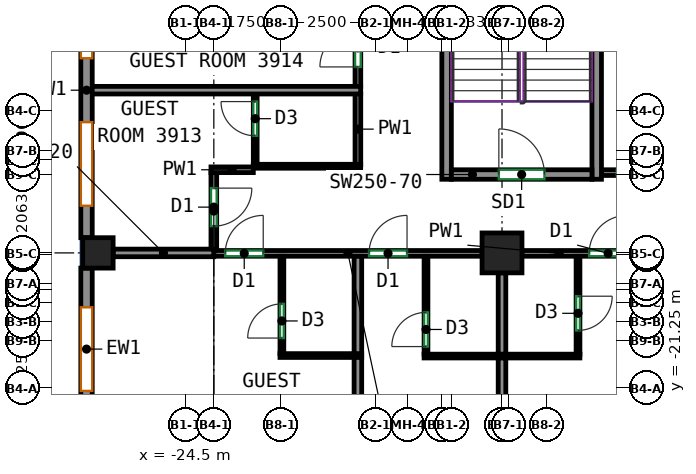
"""IFC4 building model, lengths in metres.
Left out: names, types, materials, properties, quantities, classifications, styles, units other than length and angle.
Written with IfcOpenShell. Run it as: python <this file> out.ifc"""

import sys

from ifc_helpers import new_model, si_unit, direction, frame, frame_2d, origin, origin_2d, place, context, subcontext, project, spatial, rectangle, extrude, source, transform, mapped, element, fill, save


model = new_model("IFC4")
c1 = context("Model", 3, precision=1e-05, world=origin(), true_north=direction((0.0, 1.0)))
c2 = subcontext(c1, "Body", "Model", "MODEL_VIEW")
j1 = project(units=[si_unit("LENGTHUNIT", "METRE"), si_unit("PLANEANGLEUNIT", "RADIAN")], contexts=[c1])
p1 = place(None, origin())
s1 = spatial("IfcSite", under=j1, at=p1, CompositionType="ELEMENT")
p2 = place(p1, origin())
s2 = spatial("IfcBuilding", under=s1, at=p2, CompositionType="ELEMENT")
p3 = place(p2, frame((0.0, 0.0, 168.5)))
s3 = spatial("IfcBuildingStorey", under=s2, at=p3, CompositionType="ELEMENT", Elevation=168.5)
m1 = source(origin(), c2, "Body", "SweptSolid", [
    extrude(rectangle(XDim=0.8, YDim=0.8, at=origin_2d()), origin(), (0.0, 0.0, 1.0), 3.12),
])
p4 = place(p3, frame((-26.8, -17.688, 0.0), z_axis=(0.0, 0.0, 1.0), x_axis=(1.0, 0.0, 0.0)))
e1 = element("IfcColumn", 1, at=p4, inside=s3, PredefinedType="COLUMN", context=c2, shape_type="MappedRepresentation", body=[
    mapped(m1, transform((0.0, 0.0, 0.0))),
])
m2 = source(origin(), c2, "Body", "SweptSolid", [
    extrude(rectangle(XDim=1.05, YDim=1.05, at=origin_2d()), origin(), (0.0, 0.0, 1.0), 3.12),
])
p5 = place(p3, frame((-16.167, -17.688, 0.0), z_axis=(0.0, 0.0, 1.0), x_axis=(1.0, 0.0, 0.0)))
e2 = element("IfcColumn", 2, at=p5, inside=s3, PredefinedType="COLUMN", context=c2, shape_type="MappedRepresentation", body=[
    mapped(m2, transform((0.0, 0.0, 0.0))),
])
m3 = source(origin(), c2, "Body", "SweptSolid", [
    extrude(rectangle(XDim=8.0, YDim=0.25, at=frame_2d((4.0, 0.0))), origin(), (0.0, 0.0, 1.0), 3.12),
])
for number, where, z_axis, x_axis in (
    (3, (-17.625, -15.75, 0.0), (0.0, 0.0, 1.0), (0.0, 1.0, 0.0)),
    (4, (-13.675, -15.75, 0.0), (0.0, 0.0, 1.0), (0.0, 1.0, 0.0)),
):
    element("IfcWall", number, at=place(p3, frame(where, z_axis=z_axis, x_axis=x_axis)), inside=s3, PredefinedType="SHEAR", context=c2, shape_type="MappedRepresentation", body=[
        mapped(m3, transform((0.0, 0.0, 0.0))),
    ])
m4 = source(origin(), c2, "Body", "SweptSolid", [
    extrude(rectangle(XDim=3.7, YDim=0.25, at=frame_2d((1.85, 0.0))), origin(), (0.0, 0.0, 1.0), 3.12),
])
p6 = place(p3, frame((-17.5, -15.625, 0.0), z_axis=(0.0, 0.0, 1.0), x_axis=(1.0, 0.0, 0.0)))
e5 = element("IfcWall", 5, at=p6, inside=s3, PredefinedType="SHEAR", context=c2, shape_type="MappedRepresentation", body=[
    mapped(m4, transform((0.0, 0.0, 0.0))),
])
p7 = place(p6, frame((1.25, 0.0, 0.0)))
e6 = element("IfcOpeningElement", 6, at=p7, cuts=e5, PredefinedType="OPENING", context=c2, shape_type="SweptSolid", body=[
    extrude(rectangle(XDim=1.2, YDim=2.1, at=frame_2d((0.6, 1.05))), frame((0.0, 0.135, 0.0), z_axis=(0.0, -1.0, 0.0), x_axis=(1.0, 0.0, 0.0)), (0.0, 0.0, 1.0), 0.27),
])
m5 = source(origin(), c2, "Body", "SweptSolid", [
    extrude(rectangle(XDim=7.763, YDim=0.3, at=frame_2d((3.881, 0.0))), origin(), (0.0, 0.0, 1.0), 3.12),
])
p8 = place(p3, frame((-27.1, -9.525, 0.0), z_axis=(0.0, 0.0, 1.0), x_axis=(0.0, -1.0, 0.0)))
e7 = element("IfcWall", 7, at=p8, inside=s3, PredefinedType="SOLIDWALL", context=c2, shape_type="MappedRepresentation", body=[
    mapped(m5, transform((0.0, 0.0, 0.0))),
])
p9 = place(p8, frame((0.841, 0.0, 0.85)))
e8 = element("IfcOpeningElement", 8, at=p9, cuts=e7, PredefinedType="OPENING", context=c2, shape_type="SweptSolid", body=[
    extrude(rectangle(XDim=2.2, YDim=1.95, at=frame_2d((1.1, 0.975))), frame((0.0, 0.16, 0.0), z_axis=(0.0, -1.0, 0.0), x_axis=(1.0, 0.0, 0.0)), (0.0, 0.0, 1.0), 0.32),
])
p10 = place(p8, frame((4.722, 0.0, 0.85)))
e9 = element("IfcOpeningElement", 9, at=p10, cuts=e7, PredefinedType="OPENING", context=c2, shape_type="SweptSolid", body=[
    extrude(rectangle(XDim=2.2, YDim=1.95, at=frame_2d((1.1, 0.975))), frame((0.0, 0.16, 0.0), z_axis=(0.0, -1.0, 0.0), x_axis=(1.0, 0.0, 0.0)), (0.0, 0.0, 1.0), 0.32),
])
m6 = source(origin(), c2, "Body", "SweptSolid", [
    extrude(rectangle(XDim=4.263, YDim=0.3, at=frame_2d((2.131, 0.0))), origin(), (0.0, 0.0, 1.0), 3.12),
])
p11 = place(p3, frame((-27.1, -18.087, 0.0), z_axis=(0.0, 0.0, 1.0), x_axis=(0.0, -1.0, 0.0)))
e10 = element("IfcWall", 10, at=p11, inside=s3, PredefinedType="SOLIDWALL", context=c2, shape_type="MappedRepresentation", body=[
    mapped(m6, transform((0.0, 0.0, 0.0))),
])
p12 = place(p11, frame((1.031, 0.0, 0.85)))
e11 = element("IfcOpeningElement", 11, at=p12, cuts=e10, PredefinedType="OPENING", context=c2, shape_type="SweptSolid", body=[
    extrude(rectangle(XDim=2.2, YDim=1.95, at=frame_2d((1.1, 0.975))), frame((0.0, 0.16, 0.0), z_axis=(0.0, -1.0, 0.0), x_axis=(1.0, 0.0, 0.0)), (0.0, 0.0, 1.0), 0.32),
])
p13 = place(p3, frame((-23.75, -17.7, 0.0), z_axis=(0.0, 0.0, 1.0), x_axis=(1.0, 0.0, 0.0)))
e12 = element("IfcWall", 12, at=p13, inside=s3, PredefinedType="PARTITIONING", context=c2, shape_type="SweptSolid", body=[
    extrude(rectangle(XDim=7.058, YDim=0.15, at=frame_2d((3.529, 0.0))), origin(), (0.0, 0.0, 1.0), 2.52),
])
p14 = place(p13, frame((0.3, 0.0, 0.0)))
e13 = element("IfcOpeningElement", 13, at=p14, cuts=e12, PredefinedType="OPENING", context=c2, shape_type="SweptSolid", body=[
    extrude(rectangle(XDim=1.0, YDim=2.1, at=frame_2d((0.5, 1.05))), frame((0.0, 0.085, 0.0), z_axis=(0.0, -1.0, 0.0), x_axis=(1.0, 0.0, 0.0)), (0.0, 0.0, 1.0), 0.17),
])
p15 = place(p13, frame((4.084, 0.0, 0.0)))
e14 = element("IfcOpeningElement", 14, at=p15, cuts=e12, PredefinedType="OPENING", context=c2, shape_type="SweptSolid", body=[
    extrude(rectangle(XDim=1.0, YDim=2.1, at=frame_2d((0.5, 1.05))), frame((0.0, 0.085, 0.0), z_axis=(0.0, -1.0, 0.0), x_axis=(1.0, 0.0, 0.0)), (0.0, 0.0, 1.0), 0.17),
])
p16 = place(p3, frame((-15.642, -17.7, 0.0), z_axis=(0.0, 0.0, 1.0), x_axis=(1.0, 0.0, 0.0)))
e15 = element("IfcWall", 15, at=p16, inside=s3, PredefinedType="PARTITIONING", context=c2, shape_type="SweptSolid", body=[
    extrude(rectangle(XDim=6.534, YDim=0.15, at=frame_2d((3.267, 0.0))), origin(), (0.0, 0.0, 1.0), 3.12),
])
p17 = place(p16, frame((1.768, 0.0, 0.0)))
e16 = element("IfcOpeningElement", 16, at=p17, cuts=e15, PredefinedType="OPENING", context=c2, shape_type="SweptSolid", body=[
    extrude(rectangle(XDim=1.0, YDim=2.1, at=frame_2d((0.5, 1.05))), frame((0.0, 0.085, 0.0), z_axis=(0.0, -1.0, 0.0), x_axis=(1.0, 0.0, 0.0)), (0.0, 0.0, 1.0), 0.17),
])
p18 = place(p16, frame((3.56, 0.0, 0.0)))
e17 = element("IfcOpeningElement", 17, at=p18, cuts=e15, PredefinedType="OPENING", context=c2, shape_type="SweptSolid", body=[
    extrude(rectangle(XDim=1.0, YDim=2.1, at=frame_2d((0.5, 1.05))), frame((0.0, 0.085, 0.0), z_axis=(0.0, -1.0, 0.0), x_axis=(1.0, 0.0, 0.0)), (0.0, 0.0, 1.0), 0.17),
])
p19 = place(p3, frame((-23.75, -15.575, 0.0), z_axis=(0.0, 0.0, 1.0), x_axis=(0.0, -1.0, 0.0)))
e18 = element("IfcWall", 18, at=p19, inside=s3, PredefinedType="PARTITIONING", context=c2, shape_type="SweptSolid", body=[
    extrude(rectangle(XDim=2.023, YDim=0.15, at=frame_2d((1.011, 0.0))), origin(), (0.0, 0.0, 1.0), 2.52),
])
p20 = place(p19, frame((0.408, 0.0, 0.0)))
e19 = element("IfcOpeningElement", 19, at=p20, cuts=e18, PredefinedType="OPENING", context=c2, shape_type="SweptSolid", body=[
    extrude(rectangle(XDim=1.0, YDim=2.1, at=frame_2d((0.5, 1.05))), frame((0.0, 0.085, 0.0), z_axis=(0.0, -1.0, 0.0), x_axis=(1.0, 0.0, 0.0)), (0.0, 0.0, 1.0), 0.17),
])
p21 = place(p3, frame((-23.825, -15.5, 0.0), z_axis=(0.0, 0.0, 1.0), x_axis=(1.0, 0.0, 0.0)))
e20 = element("IfcWall", 20, at=p21, inside=s3, PredefinedType="PARTITIONING", context=c2, shape_type="SweptSolid", body=[
    extrude(rectangle(XDim=1.114, YDim=0.15, at=frame_2d((0.557, 0.0))), origin(), (0.0, 0.0, 1.0), 3.12),
])
p22 = place(p3, frame((-19.959, -15.366, 0.0), z_axis=(0.0, 0.0, 1.0), x_axis=(0.0, 1.0, 0.0)))
e21 = element("IfcWall", 21, at=p22, inside=s3, PredefinedType="PARTITIONING", context=c2, shape_type="SweptSolid", body=[
    extrude(rectangle(XDim=1.87, YDim=0.15, at=frame_2d((0.935, 0.0))), origin(), (0.0, 0.0, 1.0), 3.12),
])
p23 = place(p3, frame((-19.959, -13.316, 0.0), z_axis=(0.0, 0.0, 1.0), x_axis=(0.0, 1.0, 0.0)))
e22 = element("IfcWall", 22, at=p23, inside=s3, PredefinedType="PARTITIONING", context=c2, shape_type="SweptSolid", body=[
    extrude(rectangle(XDim=2.151, YDim=0.15, at=frame_2d((1.075, 0.0))), origin(), (0.0, 0.0, 1.0), 3.12),
])
p24 = place(p23, frame((0.522, 0.0, 0.0)))
e23 = element("IfcOpeningElement", 23, at=p24, cuts=e22, PredefinedType="OPENING", context=c2, shape_type="SweptSolid", body=[
    extrude(rectangle(XDim=1.0, YDim=2.1, at=frame_2d((0.5, 1.05))), frame((0.0, 0.085, 0.0), z_axis=(0.0, -1.0, 0.0), x_axis=(1.0, 0.0, 0.0)), (0.0, 0.0, 1.0), 0.17),
])
p25 = place(p3, frame((-8.573, -15.575, 0.0), z_axis=(0.0, 0.0, 1.0), x_axis=(-1.0, 0.0, 0.0)))
e24 = element("IfcWall", 24, at=p25, inside=s3, PredefinedType="PARTITIONING", context=c2, shape_type="SweptSolid", body=[
    extrude(rectangle(XDim=4.977, YDim=0.15, at=frame_2d((2.489, 0.0))), origin(), (0.0, 0.0, 1.0), 3.12),
])
p26 = place(p25, frame((3.673, 0.0, 0.0)))
e25 = element("IfcOpeningElement", 25, at=p26, cuts=e24, PredefinedType="OPENING", context=c2, shape_type="SweptSolid", body=[
    extrude(rectangle(XDim=0.9, YDim=2.1, at=frame_2d((0.45, 1.05))), frame((0.0, 0.085, 0.0), z_axis=(0.0, -1.0, 0.0), x_axis=(1.0, 0.0, 0.0)), (0.0, 0.0, 1.0), 0.17),
])
p27 = place(p3, frame((-21.959, -20.338, 0.0), z_axis=(0.0, 0.0, 1.0), x_axis=(0.0, 1.0, 0.0)))
e26 = element("IfcWall", 26, at=p27, inside=s3, PredefinedType="PARTITIONING", context=c2, shape_type="SweptSolid", body=[
    extrude(rectangle(XDim=2.561, YDim=0.1, at=frame_2d((1.28, 0.0))), origin(), (0.0, 0.0, 1.0), 3.12),
])
p28 = place(p27, frame((0.41, 0.0, 0.0)))
e27 = element("IfcOpeningElement", 27, at=p28, cuts=e26, PredefinedType="OPENING", context=c2, shape_type="SweptSolid", body=[
    extrude(rectangle(XDim=0.9, YDim=2.1, at=frame_2d((0.45, 1.05))), frame((0.0, 0.06, 0.0), z_axis=(0.0, -1.0, 0.0), x_axis=(1.0, 0.0, 0.0)), (0.0, 0.0, 1.0), 0.12),
])
p29 = place(p3, frame((-22.009, -20.388, 0.0), z_axis=(0.0, 0.0, 1.0), x_axis=(1.0, 0.0, 0.0)))
e28 = element("IfcWall", 28, at=p29, inside=s3, PredefinedType="PARTITIONING", context=c2, shape_type="SweptSolid", body=[
    extrude(rectangle(XDim=2.15, YDim=0.1, at=frame_2d((1.075, 0.0))), origin(), (0.0, 0.0, 1.0), 3.12),
])
p30 = place(p3, frame((-19.959, -26.0, 0.0), z_axis=(0.0, 0.0, 1.0), x_axis=(0.0, 1.0, 0.0)))
e29 = element("IfcWall", 29, at=p30, inside=s3, PredefinedType="PARTITIONING", context=c2, shape_type="SweptSolid", body=[
    extrude(rectangle(XDim=5.562, YDim=0.2, at=frame_2d((2.781, 0.0))), origin(), (0.0, 0.0, 1.0), 3.12),
])
p31 = place(p3, frame((-26.4, -17.688, 0.0), z_axis=(0.0, 0.0, 1.0), x_axis=(1.0, 0.0, 0.0)))
e30 = element("IfcWall", 30, at=p31, inside=s3, PredefinedType="PARTITIONING", context=c2, shape_type="SweptSolid", body=[
    extrude(rectangle(XDim=2.648, YDim=0.2, at=frame_2d((1.324, 0.0))), origin(), (0.0, 0.0, 1.0), 2.52),
])
p32 = place(p3, frame((-19.959, -20.338, 0.0), z_axis=(0.0, 0.0, 1.0), x_axis=(0.0, 1.0, 0.0)))
e31 = element("IfcWall", 31, at=p32, inside=s3, PredefinedType="PARTITIONING", context=c2, shape_type="SweptSolid", body=[
    extrude(rectangle(XDim=2.561, YDim=0.2, at=frame_2d((1.28, 0.0))), origin(), (0.0, 0.0, 1.0), 3.12),
])
p33 = place(p3, frame((-18.167, -20.352, 0.0), z_axis=(0.0, 0.0, 1.0), x_axis=(0.0, 1.0, 0.0)))
e32 = element("IfcWall", 32, at=p33, inside=s3, PredefinedType="PARTITIONING", context=c2, shape_type="SweptSolid", body=[
    extrude(rectangle(XDim=2.575, YDim=0.1, at=frame_2d((1.288, 0.0))), origin(), (0.0, 0.0, 1.0), 3.12),
])
p34 = place(p33, frame((0.2, 0.0, 0.0)))
e33 = element("IfcOpeningElement", 33, at=p34, cuts=e32, PredefinedType="OPENING", context=c2, shape_type="SweptSolid", body=[
    extrude(rectangle(XDim=0.9, YDim=2.1, at=frame_2d((0.45, 1.05))), frame((0.0, 0.06, 0.0), z_axis=(0.0, -1.0, 0.0), x_axis=(1.0, 0.0, 0.0)), (0.0, 0.0, 1.0), 0.12),
])
p35 = place(p3, frame((-18.217, -20.402, 0.0), z_axis=(0.0, 0.0, 1.0), x_axis=(1.0, 0.0, 0.0)))
e34 = element("IfcWall", 34, at=p35, inside=s3, PredefinedType="PARTITIONING", context=c2, shape_type="SweptSolid", body=[
    extrude(rectangle(XDim=4.1, YDim=0.1, at=frame_2d((2.05, 0.0))), origin(), (0.0, 0.0, 1.0), 3.12),
])
p36 = place(p3, frame((-16.167, -25.4, 0.0), z_axis=(0.0, 0.0, 1.0), x_axis=(0.0, 1.0, 0.0)))
e35 = element("IfcWall", 35, at=p36, inside=s3, PredefinedType="PARTITIONING", context=c2, shape_type="SweptSolid", body=[
    extrude(rectangle(XDim=4.948, YDim=0.2, at=frame_2d((2.474, 0.0))), origin(), (0.0, 0.0, 1.0), 3.12),
])
p37 = place(p3, frame((-16.167, -20.352, 0.0), z_axis=(0.0, 0.0, 1.0), x_axis=(0.0, 1.0, 0.0)))
e36 = element("IfcWall", 36, at=p37, inside=s3, PredefinedType="PARTITIONING", context=c2, shape_type="SweptSolid", body=[
    extrude(rectangle(XDim=2.14, YDim=0.2, at=frame_2d((1.07, 0.0))), origin(), (0.0, 0.0, 1.0), 3.12),
])
p38 = place(p3, frame((-14.167, -17.777, 0.0), z_axis=(0.0, 0.0, 1.0), x_axis=(0.0, -1.0, 0.0)))
e37 = element("IfcWall", 37, at=p38, inside=s3, PredefinedType="PARTITIONING", context=c2, shape_type="SweptSolid", body=[
    extrude(rectangle(XDim=2.575, YDim=0.1, at=frame_2d((1.288, 0.0))), origin(), (0.0, 0.0, 1.0), 3.12),
])
p39 = place(p38, frame((1.05, 0.0, 0.0)))
e38 = element("IfcOpeningElement", 38, at=p39, cuts=e37, PredefinedType="OPENING", context=c2, shape_type="SweptSolid", body=[
    extrude(rectangle(XDim=0.9, YDim=2.1, at=frame_2d((0.45, 1.05))), frame((0.0, 0.06, 0.0), z_axis=(0.0, -1.0, 0.0), x_axis=(1.0, 0.0, 0.0)), (0.0, 0.0, 1.0), 0.12),
])
p40 = place(p3, frame((-19.886, -15.406, 0.0), z_axis=(0.0, 0.0, 1.0), x_axis=(-1.0, 0.0, 0.0)))
e39 = element("IfcWall", 39, at=p40, inside=s3, PredefinedType="PARTITIONING", context=c2, shape_type="SweptSolid", body=[
    extrude(rectangle(XDim=2.825, YDim=0.1, at=frame_2d((1.413, 0.0))), origin(), (0.0, 0.0, 1.0), 3.12),
])
p41 = place(p3, frame((-22.661, -15.356, 0.0), z_axis=(0.0, 0.0, 1.0), x_axis=(0.0, 1.0, 0.0)))
e40 = element("IfcWall", 40, at=p41, inside=s3, PredefinedType="PARTITIONING", context=c2, shape_type="SweptSolid", body=[
    extrude(rectangle(XDim=1.85, YDim=0.1, at=frame_2d((0.925, 0.0))), origin(), (0.0, 0.0, 1.0), 3.12),
])
p42 = place(p41, frame((0.75, 0.0, 0.0)))
e41 = element("IfcOpeningElement", 41, at=p42, cuts=e40, PredefinedType="OPENING", context=c2, shape_type="SweptSolid", body=[
    extrude(rectangle(XDim=0.9, YDim=2.1, at=frame_2d((0.45, 1.05))), frame((0.0, 0.06, 0.0), z_axis=(0.0, -1.0, 0.0), x_axis=(1.0, 0.0, 0.0)), (0.0, 0.0, 1.0), 0.12),
])
p43 = place(p3, frame((-27.0, -13.406, 0.0), z_axis=(0.0, 0.0, 1.0), x_axis=(1.0, 0.0, 0.0)))
e42 = element("IfcWall", 42, at=p43, inside=s3, PredefinedType="PARTITIONING", context=c2, shape_type="SweptSolid", body=[
    extrude(rectangle(XDim=7.114, YDim=0.2, at=frame_2d((3.557, 0.0))), origin(), (0.0, 0.0, 1.0), 3.12),
])
p44 = place(p9, origin())
e43 = element("IfcWindow", 43, at=p44, inside=s3, PartitioningType="SINGLE_PANEL", PredefinedType="WINDOW", context=c2, shape_type="SweptSolid", body=[
    extrude(rectangle(XDim=2.2, YDim=1.95, at=frame_2d((1.1, 0.975))), frame((0.0, 0.03, 0.0), z_axis=(0.0, -1.0, 0.0), x_axis=(1.0, 0.0, 0.0)), (0.0, 0.0, 1.0), 0.06),
])
fill(e8, e43)
p45 = place(p10, origin())
e44 = element("IfcWindow", 44, at=p45, inside=s3, PartitioningType="SINGLE_PANEL", PredefinedType="WINDOW", context=c2, shape_type="SweptSolid", body=[
    extrude(rectangle(XDim=2.2, YDim=1.95, at=frame_2d((1.1, 0.975))), frame((0.0, 0.03, 0.0), z_axis=(0.0, -1.0, 0.0), x_axis=(1.0, 0.0, 0.0)), (0.0, 0.0, 1.0), 0.06),
])
fill(e9, e44)
p46 = place(p12, origin())
e45 = element("IfcWindow", 45, at=p46, inside=s3, PartitioningType="SINGLE_PANEL", PredefinedType="WINDOW", context=c2, shape_type="SweptSolid", body=[
    extrude(rectangle(XDim=2.2, YDim=1.95, at=frame_2d((1.1, 0.975))), frame((0.0, 0.03, 0.0), z_axis=(0.0, -1.0, 0.0), x_axis=(1.0, 0.0, 0.0)), (0.0, 0.0, 1.0), 0.06),
])
fill(e11, e45)
p47 = place(p7, origin())
e46 = element("IfcDoor", 46, at=p47, inside=s3, OperationType="DOUBLE_DOOR_SINGLE_SWING", PredefinedType="DOOR", context=c2, shape_type="SweptSolid", body=[
    extrude(rectangle(XDim=1.2, YDim=2.1, at=frame_2d((0.6, 1.05))), frame((0.0, 0.025, 0.0), z_axis=(0.0, -1.0, 0.0), x_axis=(1.0, 0.0, 0.0)), (0.0, 0.0, 1.0), 0.05),
])
fill(e6, e46)
p48 = place(p34, origin())
e47 = element("IfcDoor", 47, at=p48, inside=s3, OperationType="SINGLE_SWING_LEFT", PredefinedType="DOOR", context=c2, shape_type="SweptSolid", body=[
    extrude(rectangle(XDim=0.9, YDim=2.1, at=frame_2d((0.45, 1.05))), frame((0.0, 0.025, 0.0), z_axis=(0.0, -1.0, 0.0), x_axis=(1.0, 0.0, 0.0)), (0.0, 0.0, 1.0), 0.05),
])
fill(e33, e47)
p49 = place(p28, origin())
e48 = element("IfcDoor", 48, at=p49, inside=s3, OperationType="SINGLE_SWING_LEFT", PredefinedType="DOOR", context=c2, shape_type="SweptSolid", body=[
    extrude(rectangle(XDim=0.9, YDim=2.1, at=frame_2d((0.45, 1.05))), frame((0.0, 0.025, 0.0), z_axis=(0.0, -1.0, 0.0), x_axis=(1.0, 0.0, 0.0)), (0.0, 0.0, 1.0), 0.05),
])
fill(e27, e48)
p50 = place(p39, origin())
e49 = element("IfcDoor", 49, at=p50, inside=s3, OperationType="SINGLE_SWING_LEFT", PredefinedType="DOOR", context=c2, shape_type="SweptSolid", body=[
    extrude(rectangle(XDim=0.9, YDim=2.1, at=frame_2d((0.45, 1.05))), frame((0.0, 0.025, 0.0), z_axis=(0.0, -1.0, 0.0), x_axis=(1.0, 0.0, 0.0)), (0.0, 0.0, 1.0), 0.05),
])
fill(e38, e49)
p51 = place(p14, origin())
e50 = element("IfcDoor", 50, at=p51, inside=s3, OperationType="SINGLE_SWING_RIGHT", PredefinedType="DOOR", context=c2, shape_type="SweptSolid", body=[
    extrude(rectangle(XDim=1.0, YDim=2.1, at=frame_2d((0.5, 1.05))), frame((0.0, 0.025, 0.0), z_axis=(0.0, -1.0, 0.0), x_axis=(1.0, 0.0, 0.0)), (0.0, 0.0, 1.0), 0.05),
])
fill(e13, e50)
p52 = place(p15, origin())
e51 = element("IfcDoor", 51, at=p52, inside=s3, OperationType="SINGLE_SWING_RIGHT", PredefinedType="DOOR", context=c2, shape_type="SweptSolid", body=[
    extrude(rectangle(XDim=1.0, YDim=2.1, at=frame_2d((0.5, 1.05))), frame((0.0, 0.025, 0.0), z_axis=(0.0, -1.0, 0.0), x_axis=(1.0, 0.0, 0.0)), (0.0, 0.0, 1.0), 0.05),
])
fill(e14, e51)
p53 = place(p17, origin())
e52 = element("IfcDoor", 52, at=p53, inside=s3, OperationType="SINGLE_SWING_RIGHT", PredefinedType="DOOR", context=c2, shape_type="SweptSolid", body=[
    extrude(rectangle(XDim=1.0, YDim=2.1, at=frame_2d((0.5, 1.05))), frame((0.0, 0.025, 0.0), z_axis=(0.0, -1.0, 0.0), x_axis=(1.0, 0.0, 0.0)), (0.0, 0.0, 1.0), 0.05),
])
fill(e16, e52)
p54 = place(p20, origin())
e53 = element("IfcDoor", 53, at=p54, inside=s3, OperationType="SINGLE_SWING_LEFT", PredefinedType="DOOR", context=c2, shape_type="SweptSolid", body=[
    extrude(rectangle(XDim=1.0, YDim=2.1, at=frame_2d((0.5, 1.05))), frame((0.0, 0.025, 0.0), z_axis=(0.0, -1.0, 0.0), x_axis=(1.0, 0.0, 0.0)), (0.0, 0.0, 1.0), 0.05),
])
fill(e19, e53)
p55 = place(p42, origin())
e54 = element("IfcDoor", 54, at=p55, inside=s3, OperationType="SINGLE_SWING_RIGHT", PredefinedType="DOOR", context=c2, shape_type="SweptSolid", body=[
    extrude(rectangle(XDim=0.9, YDim=2.1, at=frame_2d((0.45, 1.05))), frame((0.0, 0.025, 0.0), z_axis=(0.0, -1.0, 0.0), x_axis=(1.0, 0.0, 0.0)), (0.0, 0.0, 1.0), 0.05),
])
fill(e41, e54)
p56 = place(p24, origin())
e55 = element("IfcDoor", 55, at=p56, inside=s3, OperationType="SINGLE_SWING_LEFT", PredefinedType="DOOR", context=c2, shape_type="SweptSolid", body=[
    extrude(rectangle(XDim=1.0, YDim=2.1, at=frame_2d((0.5, 1.05))), frame((0.0, 0.025, 0.0), z_axis=(0.0, -1.0, 0.0), x_axis=(1.0, 0.0, 0.0)), (0.0, 0.0, 1.0), 0.05),
])
fill(e23, e55)
save(model, sys.argv[1])
